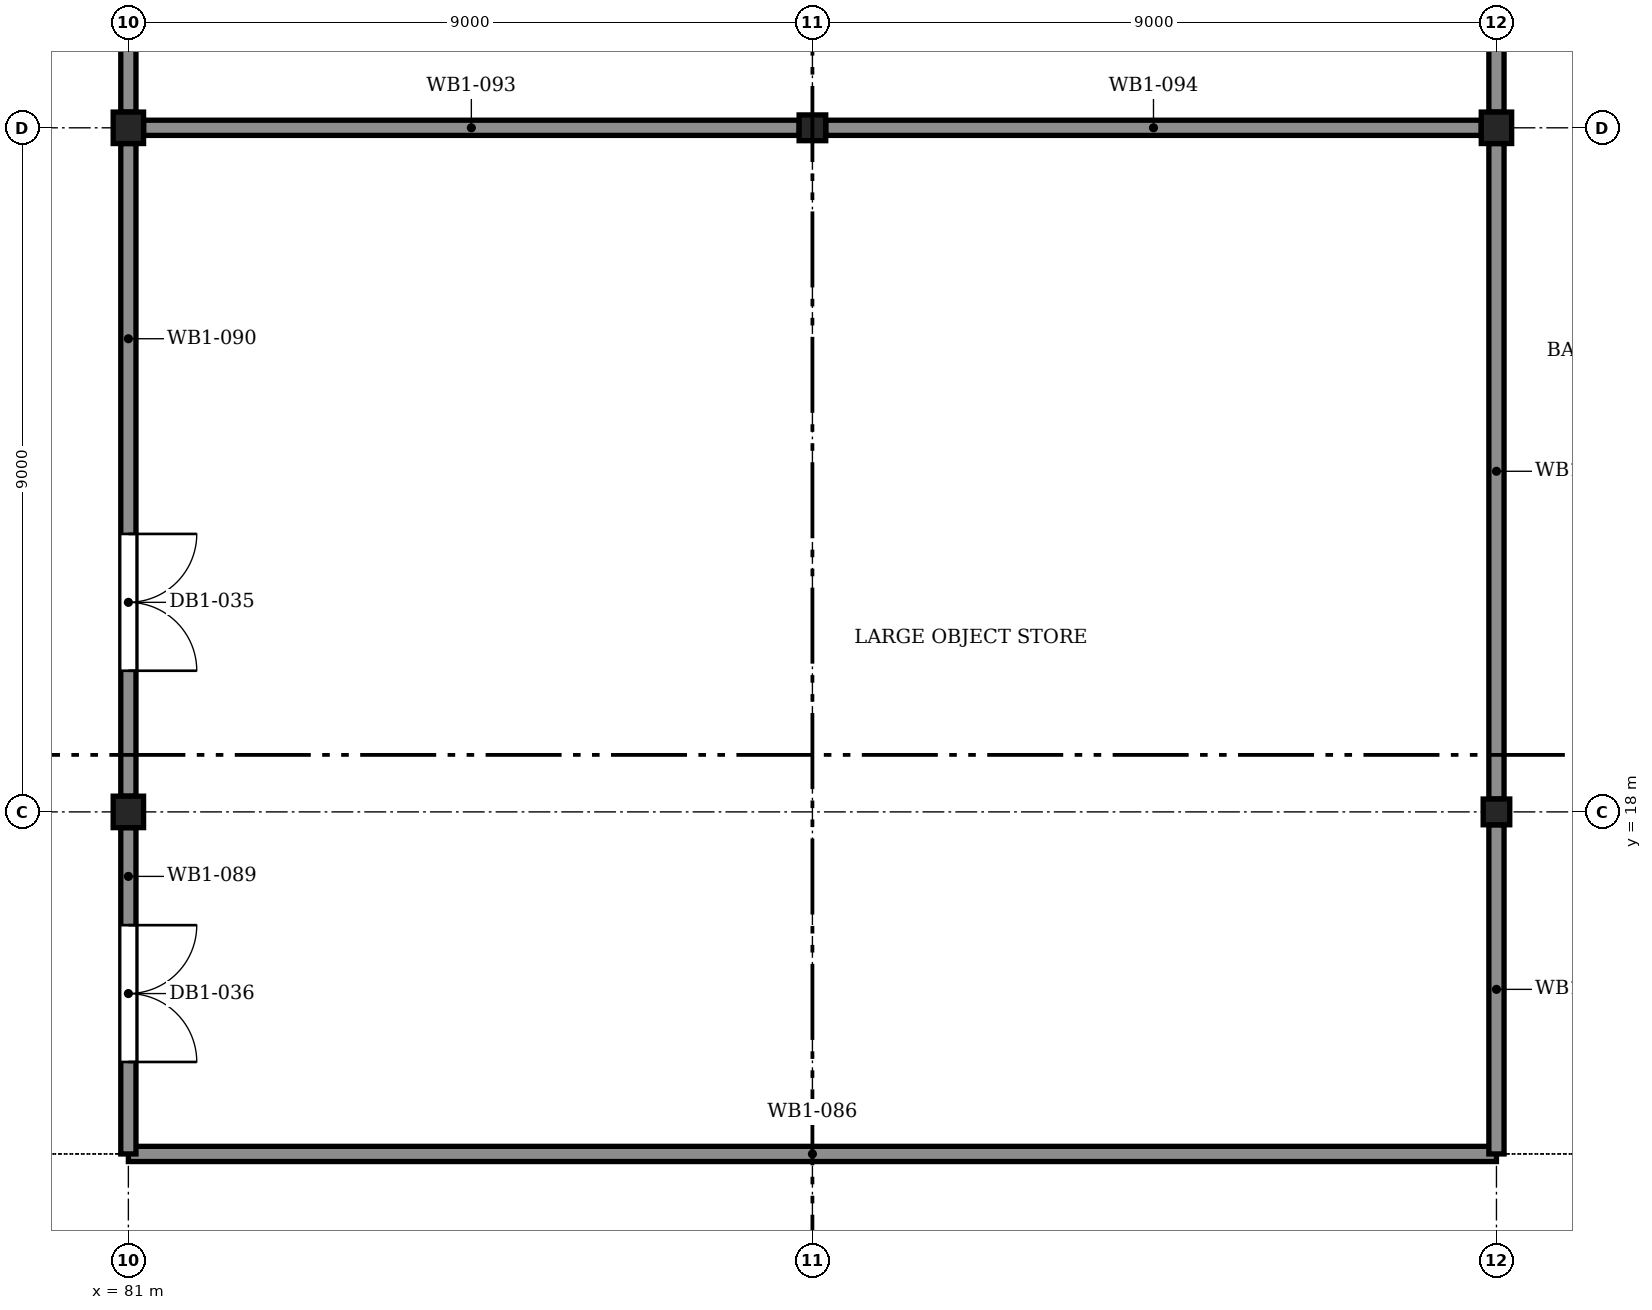
"""IFC4 building model, lengths in metres.
Left out: names, types, materials, properties, quantities, classifications, styles, units other than length and angle.
Written with IfcOpenShell. Run it as: python <this file> out.ifc"""

import sys

from ifc_helpers import new_model, si_unit, direction, frame, frame_2d, origin, origin_2d, place, context, subcontext, project, spatial, rectangle, i_section, extrude, element, fill, save


model = new_model("IFC4")
c1 = context("Model", 3, precision=1e-05, world=origin(), true_north=direction((0.0, 1.0)))
c2 = subcontext(c1, "Body", "Model", "MODEL_VIEW")
j1 = project(units=[si_unit("LENGTHUNIT", "METRE"), si_unit("PLANEANGLEUNIT", "RADIAN")], contexts=[c1])
p1 = place(None, origin())
s1 = spatial("IfcSite", under=j1, at=p1, CompositionType="ELEMENT")
p2 = place(p1, origin())
s2 = spatial("IfcBuilding", under=s1, at=p2, CompositionType="ELEMENT")
p3 = place(p2, frame((0.0, 0.0, -4.8)))
s3 = spatial("IfcBuildingStorey", under=s2, at=p3, CompositionType="ELEMENT", Elevation=-4.8)
p4 = place(p3, frame((81.0, 18.0, 0.0), z_axis=(0.0, 0.0, 1.0), x_axis=(1.0, 0.0, 0.0)))
e1 = element("IfcColumn", 1, at=p4, inside=s3, PredefinedType="COLUMN", context=c2, shape_type="SweptSolid", body=[
    extrude(i_section(OverallWidth=0.4, OverallDepth=0.414, WebThickness=0.025, FlangeThickness=0.032, at=origin_2d()), origin(), (0.0, 0.0, 1.0), 4.8),
])
p5 = place(p3, frame((99.0, 18.0, 0.0), z_axis=(0.0, 0.0, 1.0), x_axis=(1.0, 0.0, 0.0)))
e2 = element("IfcColumn", 2, at=p5, inside=s3, PredefinedType="COLUMN", context=c2, shape_type="SweptSolid", body=[
    extrude(i_section(OverallWidth=0.35, OverallDepth=0.339, WebThickness=0.025, FlangeThickness=0.032, at=origin_2d()), origin(), (0.0, 0.0, 1.0), 4.8),
])
p6 = place(p3, frame((81.0, 27.0, 0.0), z_axis=(0.0, 0.0, 1.0), x_axis=(1.0, 0.0, 0.0)))
e3 = element("IfcColumn", 3, at=p6, inside=s3, PredefinedType="COLUMN", context=c2, shape_type="SweptSolid", body=[
    extrude(i_section(OverallWidth=0.4, OverallDepth=0.414, WebThickness=0.025, FlangeThickness=0.032, at=origin_2d()), origin(), (0.0, 0.0, 1.0), 4.8),
])
p7 = place(p3, frame((90.0, 27.0, 0.0), z_axis=(0.0, 0.0, 1.0), x_axis=(1.0, 0.0, 0.0)))
e4 = element("IfcColumn", 4, at=p7, inside=s3, PredefinedType="COLUMN", context=c2, shape_type="SweptSolid", body=[
    extrude(i_section(OverallWidth=0.35, OverallDepth=0.339, WebThickness=0.025, FlangeThickness=0.032, at=origin_2d()), origin(), (0.0, 0.0, 1.0), 4.8),
])
p8 = place(p3, frame((99.0, 27.0, 0.0), z_axis=(0.0, 0.0, 1.0), x_axis=(1.0, 0.0, 0.0)))
e5 = element("IfcColumn", 5, at=p8, inside=s3, PredefinedType="COLUMN", context=c2, shape_type="SweptSolid", body=[
    extrude(i_section(OverallWidth=0.4, OverallDepth=0.414, WebThickness=0.025, FlangeThickness=0.032, at=origin_2d()), origin(), (0.0, 0.0, 1.0), 4.8),
])
p9 = place(p3, frame((81.0, 13.5, 0.0), z_axis=(0.0, 0.0, 1.0), x_axis=(1.0, 0.0, 0.0)))
e6 = element("IfcWall", 6, at=p9, inside=s3, PredefinedType="PARTITIONING", context=c2, shape_type="SweptSolid", body=[
    extrude(rectangle(XDim=18.0, YDim=0.2, at=frame_2d((9.0, 0.0))), origin(), (0.0, 0.0, 1.0), 4.023),
])
p10 = place(p3, frame((81.0, 13.5, 0.0), z_axis=(0.0, 0.0, 1.0), x_axis=(0.0, 1.0, 0.0)))
e7 = element("IfcWall", 7, at=p10, inside=s3, PredefinedType="PARTITIONING", context=c2, shape_type="SweptSolid", body=[
    extrude(rectangle(XDim=4.293, YDim=0.2, at=frame_2d((2.146, 0.0))), origin(), (0.0, 0.0, 1.0), 4.023),
])
p11 = place(p10, frame((1.21, 0.0, 0.0)))
e8 = element("IfcOpeningElement", 8, at=p11, cuts=e7, PredefinedType="OPENING", context=c2, shape_type="SweptSolid", body=[
    extrude(rectangle(XDim=1.8, YDim=2.1, at=frame_2d((0.9, 1.05))), frame((0.0, 0.11, 0.0), z_axis=(0.0, -1.0, 0.0), x_axis=(1.0, 0.0, 0.0)), (0.0, 0.0, 1.0), 0.22),
])
p12 = place(p3, frame((81.0, 18.207, 0.0), z_axis=(0.0, 0.0, 1.0), x_axis=(0.0, 1.0, 0.0)))
e9 = element("IfcWall", 9, at=p12, inside=s3, PredefinedType="PARTITIONING", context=c2, shape_type="SweptSolid", body=[
    extrude(rectangle(XDim=8.586, YDim=0.2, at=frame_2d((4.293, 0.0))), origin(), (0.0, 0.0, 1.0), 4.023),
])
p13 = place(p12, frame((1.65, 0.0, 0.0)))
e10 = element("IfcOpeningElement", 10, at=p13, cuts=e9, PredefinedType="OPENING", context=c2, shape_type="SweptSolid", body=[
    extrude(rectangle(XDim=1.8, YDim=2.1, at=frame_2d((0.9, 1.05))), frame((0.0, 0.11, 0.0), z_axis=(0.0, -1.0, 0.0), x_axis=(1.0, 0.0, 0.0)), (0.0, 0.0, 1.0), 0.22),
])
p14 = place(p3, frame((81.0, 27.207, 0.0), z_axis=(0.0, 0.0, 1.0), x_axis=(0.0, 1.0, 0.0)))
e11 = element("IfcWall", 11, at=p14, inside=s3, PredefinedType="PARTITIONING", context=c2, shape_type="SweptSolid", body=[
    extrude(rectangle(XDim=8.586, YDim=0.2, at=frame_2d((4.293, 0.0))), origin(), (0.0, 0.0, 1.0), 4.023),
])
p15 = place(p14, frame((3.75, 0.0, 0.0)))
e12 = element("IfcOpeningElement", 12, at=p15, cuts=e11, PredefinedType="OPENING", context=c2, shape_type="SweptSolid", body=[
    extrude(rectangle(XDim=1.0, YDim=2.1, at=frame_2d((0.5, 1.05))), frame((0.0, 0.11, 0.0), z_axis=(0.0, -1.0, 0.0), x_axis=(1.0, 0.0, 0.0)), (0.0, 0.0, 1.0), 0.22),
])
for number, where, z_axis, x_axis in (
    (13, (81.2, 27.0, 0.0), (0.0, 0.0, 1.0), (1.0, 0.0, 0.0)),
    (14, (90.175, 27.0, 0.0), (0.0, 0.0, 1.0), (1.0, 0.0, 0.0)),
):
    element("IfcWall", number, at=place(p3, frame(where, z_axis=z_axis, x_axis=x_axis)), inside=s3, PredefinedType="PARTITIONING", context=c2, shape_type="SweptSolid", body=[
        extrude(rectangle(XDim=8.625, YDim=0.2, at=frame_2d((4.312, 0.0))), origin(), (0.0, 0.0, 1.0), 4.023),
    ])
p16 = place(p3, frame((99.0, 13.5, 0.0), z_axis=(0.0, 0.0, 1.0), x_axis=(0.0, 1.0, 0.0)))
e15 = element("IfcWall", 15, at=p16, inside=s3, PredefinedType="PARTITIONING", context=c2, shape_type="SweptSolid", body=[
    extrude(rectangle(XDim=4.331, YDim=0.2, at=frame_2d((2.165, 0.0))), origin(), (0.0, 0.0, 1.0), 4.023),
])
p17 = place(p3, frame((99.0, 18.169, 0.0), z_axis=(0.0, 0.0, 1.0), x_axis=(0.0, 1.0, 0.0)))
e16 = element("IfcWall", 16, at=p17, inside=s3, PredefinedType="PARTITIONING", context=c2, shape_type="SweptSolid", body=[
    extrude(rectangle(XDim=8.624, YDim=0.2, at=frame_2d((4.312, 0.0))), origin(), (0.0, 0.0, 1.0), 4.023),
])
p18 = place(p3, frame((99.0, 27.207, 0.0), z_axis=(0.0, 0.0, 1.0), x_axis=(0.0, 1.0, 0.0)))
e17 = element("IfcWall", 17, at=p18, inside=s3, PredefinedType="PARTITIONING", context=c2, shape_type="SweptSolid", body=[
    extrude(rectangle(XDim=8.586, YDim=0.2, at=frame_2d((4.293, 0.0))), origin(), (0.0, 0.0, 1.0), 4.023),
])
p19 = place(p13, frame((1.8, 0.0, 0.0), z_axis=(0.0, 0.0, 1.0), x_axis=(-1.0, 0.0, 0.0)))
e18 = element("IfcDoor", 18, at=p19, inside=s3, OperationType="DOUBLE_DOOR_SINGLE_SWING", PredefinedType="DOOR", context=c2, shape_type="SweptSolid", body=[
    extrude(rectangle(XDim=1.8, YDim=2.1, at=frame_2d((0.9, 1.05))), frame((0.0, 0.025, 0.0), z_axis=(0.0, -1.0, 0.0), x_axis=(1.0, 0.0, 0.0)), (0.0, 0.0, 1.0), 0.05),
])
fill(e10, e18)
p20 = place(p11, frame((1.8, 0.0, 0.0), z_axis=(0.0, 0.0, 1.0), x_axis=(-1.0, 0.0, 0.0)))
e19 = element("IfcDoor", 19, at=p20, inside=s3, OperationType="DOUBLE_DOOR_SINGLE_SWING", PredefinedType="DOOR", context=c2, shape_type="SweptSolid", body=[
    extrude(rectangle(XDim=1.8, YDim=2.1, at=frame_2d((0.9, 1.05))), frame((0.0, 0.025, 0.0), z_axis=(0.0, -1.0, 0.0), x_axis=(1.0, 0.0, 0.0)), (0.0, 0.0, 1.0), 0.05),
])
fill(e8, e19)
save(model, sys.argv[1])
